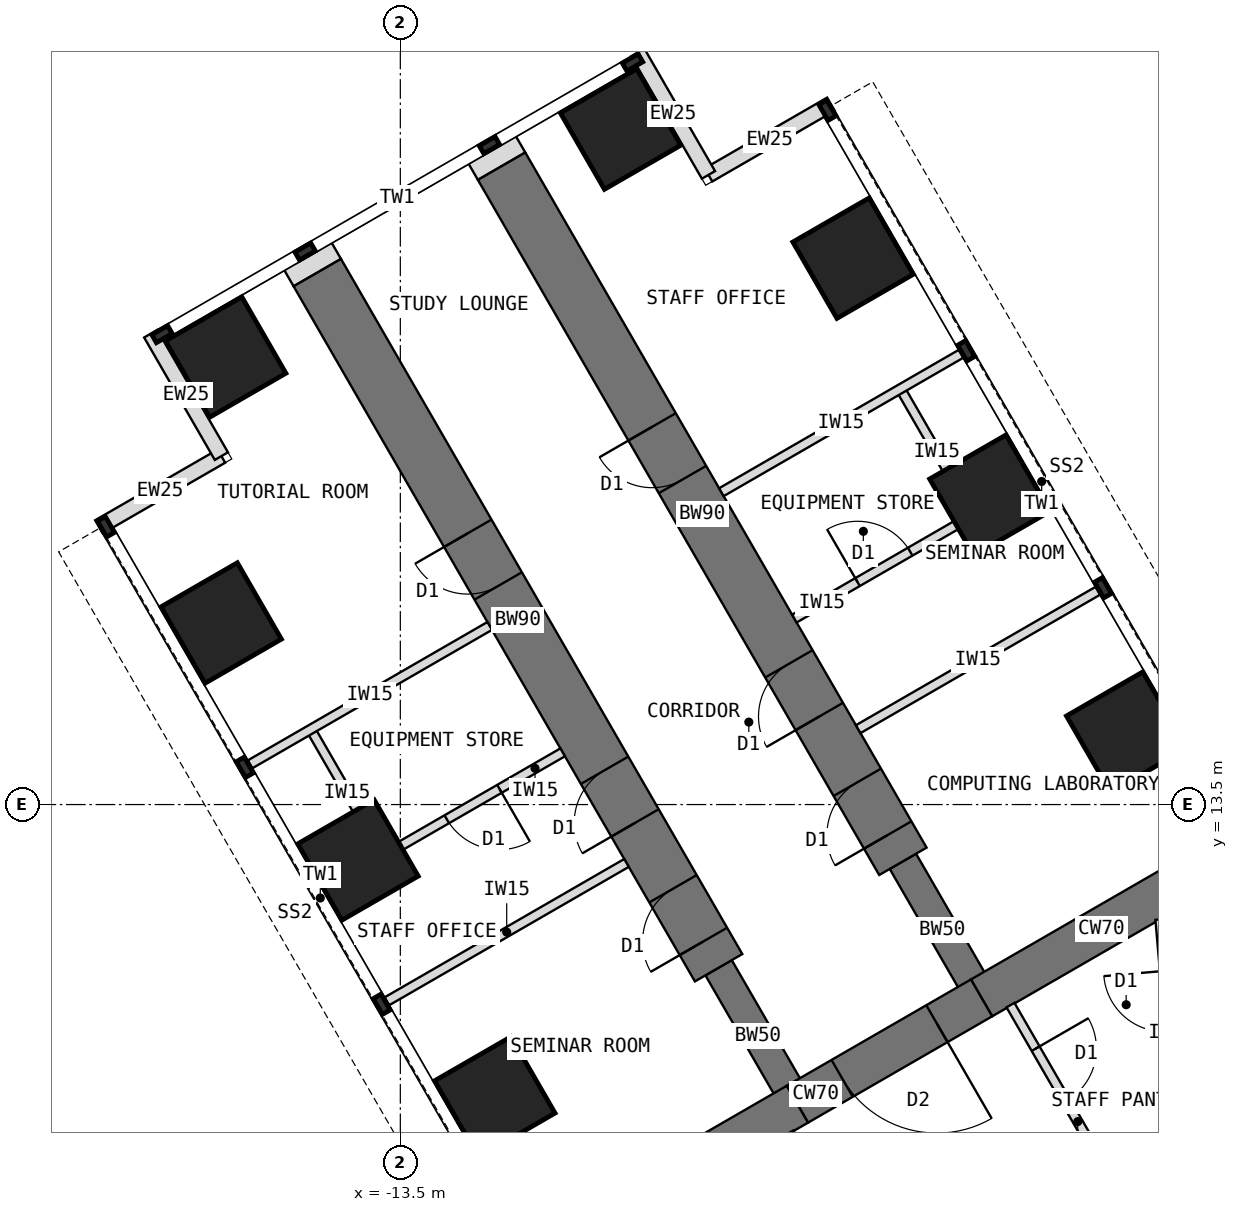
"""IFC4 building model, lengths in metres.
Left out: names, types, materials, properties, quantities, classifications, styles, units other than length and angle.
Written with IfcOpenShell. Run it as: python <this file> out.ifc"""

import sys

from ifc_helpers import new_model, si_unit, direction, frame, frame_2d, origin, origin_2d, place, context, subcontext, project, spatial, rectangle, extrude, element, fill, save


model = new_model("IFC4")
c1 = context("Model", 3, precision=1e-05, world=origin(), true_north=direction((0.0, 1.0)))
c2 = subcontext(c1, "Body", "Model", "MODEL_VIEW")
j1 = project(units=[si_unit("LENGTHUNIT", "METRE"), si_unit("PLANEANGLEUNIT", "RADIAN")], contexts=[c1])
p1 = place(None, origin())
s1 = spatial("IfcSite", under=j1, at=p1, CompositionType="ELEMENT")
p2 = place(p1, origin())
s2 = spatial("IfcBuilding", under=s1, at=p2, CompositionType="ELEMENT")
p3 = place(p2, frame((0.0, 0.0, 68.5)))
s3 = spatial("IfcBuildingStorey", under=s2, at=p3, CompositionType="ELEMENT", Elevation=68.5)
p4 = place(p3, frame((0.0, 12.596, 0.0), z_axis=(0.0, 0.0, 1.0), x_axis=(-0.866011268655, -0.500024481964, 0.0)))
e1 = element("IfcWall", 1, at=p4, inside=s3, PredefinedType="SHEAR", context=c2, shape_type="SweptSolid", body=[
    extrude(rectangle(XDim=4.548, YDim=0.7, at=frame_2d((2.274, 0.0))), origin(), (0.0, 0.0, 1.0), 4.0),
])
p5 = place(p3, frame((-3.939, 10.322, 0.0), z_axis=(0.0, 0.0, 1.0), x_axis=(-0.866019471182, -0.500010275428, 0.0)))
e2 = element("IfcWall", 2, at=p5, inside=s3, PredefinedType="SHEAR", context=c2, shape_type="SweptSolid", body=[
    extrude(rectangle(XDim=3.5, YDim=0.7, at=frame_2d((1.75, 0.0))), origin(), (0.0, 0.0, 1.0), 4.0),
])
p6 = place(p5, frame((0.85, 0.0, 0.0)))
e3 = element("IfcOpeningElement", 3, at=p6, cuts=e2, PredefinedType="OPENING", context=c2, shape_type="SweptSolid", body=[
    extrude(rectangle(XDim=1.8, YDim=2.1, at=frame_2d((0.9, 1.05))), frame((0.0, 0.36, 0.0), z_axis=(0.0, -1.0, 0.0), x_axis=(1.0, 0.0, 0.0)), (0.0, 0.0, 1.0), 0.72),
])
p7 = place(p3, frame((-6.97, 8.572, 0.0), z_axis=(0.0, 0.0, 1.0), x_axis=(-0.866034513004, -0.499984222037, 0.0)))
e4 = element("IfcWall", 4, at=p7, inside=s3, PredefinedType="SHEAR", context=c2, shape_type="SweptSolid", body=[
    extrude(rectangle(XDim=4.548, YDim=0.7, at=frame_2d((2.274, 0.0))), origin(), (0.0, 0.0, 1.0), 4.0),
])
p8 = place(p3, frame((-6.97, 8.572, 0.0), z_axis=(0.0, 0.0, 1.0), x_axis=(-0.499988811324, 0.866031863473, 0.0)))
e5 = element("IfcWall", 5, at=p8, inside=s3, PredefinedType="SHEAR", context=c2, shape_type="SweptSolid", body=[
    extrude(rectangle(XDim=2.592, YDim=0.5, at=frame_2d((1.296, 0.0))), origin(), (0.0, 0.0, 1.0), 4.0),
])
p9 = place(p3, frame((-8.266, 10.816, 0.0), z_axis=(0.0, 0.0, 1.0), x_axis=(-0.499996231654, 0.866027579429, 0.0)))
e6 = element("IfcWall", 6, at=p9, inside=s3, PredefinedType="SHEAR", context=c2, shape_type="SweptSolid", body=[
    extrude(rectangle(XDim=13.2, YDim=0.9, at=frame_2d((6.6, 0.0))), origin(), (0.0, 0.0, 1.0), 4.0),
])
p10 = place(p9, frame((0.5, 0.0, 0.0)))
e7 = element("IfcOpeningElement", 7, at=p10, cuts=e6, PredefinedType="OPENING", context=c2, shape_type="SweptSolid", body=[
    extrude(rectangle(XDim=1.0, YDim=2.1, at=frame_2d((0.5, 1.05))), frame((0.0, 0.46, 0.0), z_axis=(0.0, -1.0, 0.0), x_axis=(1.0, 0.0, 0.0)), (0.0, 0.0, 1.0), 0.92),
])
p11 = place(p9, frame((2.75, 0.0, 0.0)))
e8 = element("IfcOpeningElement", 8, at=p11, cuts=e6, PredefinedType="OPENING", context=c2, shape_type="SweptSolid", body=[
    extrude(rectangle(XDim=1.0, YDim=2.1, at=frame_2d((0.5, 1.05))), frame((0.0, 0.46, 0.0), z_axis=(0.0, -1.0, 0.0), x_axis=(1.0, 0.0, 0.0)), (0.0, 0.0, 1.0), 0.92),
])
p12 = place(p9, frame((7.25, 0.0, 0.0)))
e9 = element("IfcOpeningElement", 9, at=p12, cuts=e6, PredefinedType="OPENING", context=c2, shape_type="SweptSolid", body=[
    extrude(rectangle(XDim=1.0, YDim=2.1, at=frame_2d((0.5, 1.05))), frame((0.0, 0.46, 0.0), z_axis=(0.0, -1.0, 0.0), x_axis=(1.0, 0.0, 0.0)), (0.0, 0.0, 1.0), 0.92),
])
p13 = place(p3, frame((-3.939, 10.322, 0.0), z_axis=(0.0, 0.0, 1.0), x_axis=(-0.499918158782, 0.866072649678, 0.0)))
e10 = element("IfcWall", 10, at=p13, inside=s3, PredefinedType="SHEAR", context=c2, shape_type="SweptSolid", body=[
    extrude(rectangle(XDim=2.592, YDim=0.5, at=frame_2d((1.296, 0.0))), origin(), (0.0, 0.0, 1.0), 4.0),
])
p14 = place(p3, frame((-5.234, 12.566, 0.0), z_axis=(0.0, 0.0, 1.0), x_axis=(-0.500010103361, 0.866019570528, 0.0)))
e11 = element("IfcWall", 11, at=p14, inside=s3, PredefinedType="SHEAR", context=c2, shape_type="SweptSolid", body=[
    extrude(rectangle(XDim=13.2, YDim=0.9, at=frame_2d((6.6, 0.0))), origin(), (0.0, 0.0, 1.0), 4.0),
])
p15 = place(p14, frame((0.5, 0.0, 0.0)))
e12 = element("IfcOpeningElement", 12, at=p15, cuts=e11, PredefinedType="OPENING", context=c2, shape_type="SweptSolid", body=[
    extrude(rectangle(XDim=1.0, YDim=2.1, at=frame_2d((0.5, 1.05))), frame((0.0, 0.46, 0.0), z_axis=(0.0, -1.0, 0.0), x_axis=(1.0, 0.0, 0.0)), (0.0, 0.0, 1.0), 0.92),
])
p16 = place(p14, frame((2.75, 0.0, 0.0)))
e13 = element("IfcOpeningElement", 13, at=p16, cuts=e11, PredefinedType="OPENING", context=c2, shape_type="SweptSolid", body=[
    extrude(rectangle(XDim=1.0, YDim=2.1, at=frame_2d((0.5, 1.05))), frame((0.0, 0.46, 0.0), z_axis=(0.0, -1.0, 0.0), x_axis=(1.0, 0.0, 0.0)), (0.0, 0.0, 1.0), 0.92),
])
p17 = place(p14, frame((7.25, 0.0, 0.0)))
e14 = element("IfcOpeningElement", 14, at=p17, cuts=e11, PredefinedType="OPENING", context=c2, shape_type="SweptSolid", body=[
    extrude(rectangle(XDim=1.0, YDim=2.1, at=frame_2d((0.5, 1.05))), frame((0.0, 0.46, 0.0), z_axis=(0.0, -1.0, 0.0), x_axis=(1.0, 0.0, 0.0)), (0.0, 0.0, 1.0), 0.92),
])
for number, where, z_axis, x_axis in (
    (15, (-11.946, 8.691, 0.0), (0.0, 0.0, 1.0), (0.866, 0.5, 0.0)),
    (16, (-1.554, 14.691, 0.0), (0.0, 0.0, 1.0), (0.866, 0.5, 0.0)),
    (17, (-14.196, 12.588, 0.0), (0.0, 0.0, 1.0), (0.866, 0.5, 0.0)),
    (18, (-3.804, 18.588, 0.0), (0.0, 0.0, 1.0), (0.866, 0.5, 0.0)),
    (19, (-16.446, 16.486, 0.0), (0.0, 0.0, 1.0), (0.866, 0.5, 0.0)),
    (20, (-6.054, 22.486, 0.0), (0.0, 0.0, 1.0), (0.866, 0.5, 0.0)),
    (21, (-16.373, 20.858, 0.0), (0.0, 0.0, 1.0), (0.866, 0.5, 0.0)),
    (22, (-9.877, 24.608, 0.0), (0.0, 0.0, 1.0), (0.866, 0.5, 0.0)),
):
    element("IfcColumn", number, at=place(p3, frame(where, z_axis=z_axis, x_axis=x_axis)), inside=s3, PredefinedType="COLUMN", context=c2, shape_type="SweptSolid", body=[
        extrude(rectangle(XDim=1.45, YDim=1.45, at=origin_2d()), origin(), (0.0, 0.0, 1.0), 4.0),
    ])
for number, where, z_axis, x_axis in (
    (23, (-18.456, 18.067, 0.0), (0.0, 0.0, 1.0), (0.866, 0.5, 0.0)),
    (24, (-16.443, 19.23, 0.0), (0.0, 0.0, 1.0), (-0.5, 0.866, 0.0)),
    (25, (-6.419, 25.017, 0.0), (0.0, 0.0, 1.0), (-0.866, -0.5, 0.0)),
    (26, (-8.432, 23.855, 0.0), (0.0, 0.0, 1.0), (-0.5, 0.866, 0.0)),
):
    element("IfcWall", number, at=place(p3, frame(where, z_axis=z_axis, x_axis=x_axis)), inside=s3, PredefinedType="STANDARD", context=c2, shape_type="SweptSolid", body=[
        extrude(rectangle(XDim=2.325, YDim=0.25, at=frame_2d((1.163, 0.0))), origin(), (0.0, 0.0, 1.0), 3.8),
    ])
for number, where, z_axis, x_axis in (
    (27, (-14.865, 22.248, 0.0), (0.0, 0.0, 1.0), (-0.5, 0.866, 0.0)),
    (28, (-11.834, 23.998, 0.0), (0.0, 0.0, 1.0), (-0.5, 0.866, 0.0)),
):
    element("IfcWall", number, at=place(p3, frame(where, z_axis=z_axis, x_axis=x_axis)), inside=s3, PredefinedType="PARTITIONING", context=c2, shape_type="SweptSolid", body=[
        extrude(rectangle(XDim=0.31, YDim=0.9, at=frame_2d((0.155, 0.0))), origin(), (0.0, 0.0, 1.0), 3.8),
    ])
p18 = place(p3, frame((-1.201, 6.12, 0.0), z_axis=(0.0, 0.0, 1.0), x_axis=(0.500002627198, 0.866023886965, 0.0)))
e29 = element("IfcWall", 29, at=p18, inside=s3, PredefinedType="SHEAR", context=c2, shape_type="SweptSolid", body=[
    extrude(rectangle(XDim=5.858, YDim=0.4, at=frame_2d((2.929, 0.0))), origin(), (0.0, 0.0, 1.0), 4.0),
])
for number, where, z_axis, x_axis in (
    (30, (-9.78, 12.54, 0.0), (0.0, 0.0, 1.0), (-0.866, -0.5, 0.0)),
    (31, (-12.03, 16.437, 0.0), (0.0, 0.0, 1.0), (-0.866, -0.5, 0.0)),
):
    element("IfcWall", number, at=place(p3, frame(where, z_axis=z_axis, x_axis=x_axis)), inside=s3, PredefinedType="PARTITIONING", context=c2, shape_type="SweptSolid", body=[
        extrude(rectangle(XDim=4.55, YDim=0.15, at=frame_2d((2.275, 0.0))), origin(), (0.0, 0.0, 1.0), 3.8),
    ])
p19 = place(p3, frame((-13.775, 12.658, 0.0), z_axis=(0.0, 0.0, 1.0), x_axis=(-0.500033551112, 0.866006032174, 0.0)))
e32 = element("IfcWall", 32, at=p19, inside=s3, PredefinedType="PARTITIONING", context=c2, shape_type="SweptSolid", body=[
    extrude(rectangle(XDim=2.4, YDim=0.15, at=frame_2d((1.2, 0.0))), origin(), (0.0, 0.0, 1.0), 3.8),
])
p20 = place(p3, frame((-10.83, 14.359, 0.0), z_axis=(0.0, 0.0, 1.0), x_axis=(-0.865989465428, -0.500062241894, 0.0)))
e33 = element("IfcWall", 33, at=p20, inside=s3, PredefinedType="PARTITIONING", context=c2, shape_type="SweptSolid", body=[
    extrude(rectangle(XDim=3.4, YDim=0.15, at=frame_2d((1.7, 0.0))), origin(), (0.0, 0.0, 1.0), 3.8),
])
p21 = place(p20, frame((1.2, 0.0, 0.0)))
e34 = element("IfcOpeningElement", 34, at=p21, cuts=e33, PredefinedType="OPENING", context=c2, shape_type="SweptSolid", body=[
    extrude(rectangle(XDim=1.0, YDim=2.1, at=frame_2d((0.5, 1.05))), frame((0.0, 0.085, 0.0), z_axis=(0.0, -1.0, 0.0), x_axis=(1.0, 0.0, 0.0)), (0.0, 0.0, 1.0), 0.17),
])
for number, where, z_axis, x_axis in (
    (35, (-5.97, 14.74, 0.0), (0.0, 0.0, 1.0), (0.866, 0.5, 0.0)),
    (36, (-8.22, 18.637, 0.0), (0.0, 0.0, 1.0), (0.866, 0.5, 0.0)),
):
    element("IfcWall", number, at=place(p3, frame(where, z_axis=z_axis, x_axis=x_axis)), inside=s3, PredefinedType="PARTITIONING", context=c2, shape_type="SweptSolid", body=[
        extrude(rectangle(XDim=4.55, YDim=0.15, at=frame_2d((2.275, 0.0))), origin(), (0.0, 0.0, 1.0), 3.8),
    ])
p22 = place(p3, frame((-4.075, 18.259, 0.0), z_axis=(0.0, 0.0, 1.0), x_axis=(-0.500001309137, 0.866024647952, 0.0)))
e37 = element("IfcWall", 37, at=p22, inside=s3, PredefinedType="PARTITIONING", context=c2, shape_type="SweptSolid", body=[
    extrude(rectangle(XDim=2.4, YDim=0.15, at=frame_2d((1.2, 0.0))), origin(), (0.0, 0.0, 1.0), 3.8),
])
p23 = place(p3, frame((-7.02, 16.559, 0.0), z_axis=(0.0, 0.0, 1.0), x_axis=(0.866038511948, 0.499977295307, 0.0)))
e38 = element("IfcWall", 38, at=p23, inside=s3, PredefinedType="PARTITIONING", context=c2, shape_type="SweptSolid", body=[
    extrude(rectangle(XDim=3.4, YDim=0.15, at=frame_2d((1.7, 0.0))), origin(), (0.0, 0.0, 1.0), 3.8),
])
p24 = place(p23, frame((1.2, 0.0, 0.0)))
e39 = element("IfcOpeningElement", 39, at=p24, cuts=e38, PredefinedType="OPENING", context=c2, shape_type="SweptSolid", body=[
    extrude(rectangle(XDim=1.0, YDim=2.1, at=frame_2d((0.5, 1.05))), frame((0.0, 0.085, 0.0), z_axis=(0.0, -1.0, 0.0), x_axis=(1.0, 0.0, 0.0)), (0.0, 0.0, 1.0), 0.17),
])
p25 = place(p3, frame((-4.89, 4.27, 0.0), z_axis=(0.0, 0.0, 1.0), x_axis=(-0.500007369519, 0.866021148949, 0.0)))
e40 = element("IfcWall", 40, at=p25, inside=s3, PredefinedType="PARTITIONING", context=c2, shape_type="SweptSolid", body=[
    extrude(rectangle(XDim=4.426, YDim=0.15, at=frame_2d((2.213, 0.0))), origin(), (0.0, 0.0, 1.0), 3.8),
])
p26 = place(p25, frame((0.828, 0.0, 0.0)))
e41 = element("IfcOpeningElement", 41, at=p26, cuts=e40, PredefinedType="OPENING", context=c2, shape_type="SweptSolid", body=[
    extrude(rectangle(XDim=1.0, YDim=2.1, at=frame_2d((0.5, 1.05))), frame((0.0, 0.085, 0.0), z_axis=(0.0, -1.0, 0.0), x_axis=(1.0, 0.0, 0.0)), (0.0, 0.0, 1.0), 0.17),
])
p27 = place(p3, frame((-3.466, 10.202, 0.0), z_axis=(0.0, 0.0, 1.0), x_axis=(0.500007369519, -0.866021148949, 0.0)))
e42 = element("IfcWall", 42, at=p27, inside=s3, PredefinedType="PARTITIONING", context=c2, shape_type="SweptSolid", body=[
    extrude(rectangle(XDim=4.426, YDim=0.15, at=frame_2d((2.213, 0.0))), origin(), (0.0, 0.0, 1.0), 3.8),
])
p28 = place(p27, frame((0.828, 0.0, 0.0)))
e43 = element("IfcOpeningElement", 43, at=p28, cuts=e42, PredefinedType="OPENING", context=c2, shape_type="SweptSolid", body=[
    extrude(rectangle(XDim=1.0, YDim=2.1, at=frame_2d((0.5, 1.05))), frame((0.0, 0.085, 0.0), z_axis=(0.0, -1.0, 0.0), x_axis=(1.0, 0.0, 0.0)), (0.0, 0.0, 1.0), 0.17),
])
p29 = place(p3, frame((-0.618, 7.129, 0.0), z_axis=(0.0, 0.0, 1.0), x_axis=(-0.086409450071, 0.996259708579, 0.0)))
e44 = element("IfcWall", 44, at=p29, inside=s3, PredefinedType="PARTITIONING", context=c2, shape_type="SweptSolid", body=[
    extrude(rectangle(XDim=4.498, YDim=0.15, at=frame_2d((2.249, 0.0))), origin(), (0.0, 0.0, 1.0), 3.8),
])
p30 = place(p29, frame((2.648, 0.0, 0.0)))
e45 = element("IfcOpeningElement", 45, at=p30, cuts=e44, PredefinedType="OPENING", context=c2, shape_type="SweptSolid", body=[
    extrude(rectangle(XDim=1.0, YDim=2.1, at=frame_2d((0.5, 1.05))), frame((0.0, 0.085, 0.0), z_axis=(0.0, -1.0, 0.0), x_axis=(1.0, 0.0, 0.0)), (0.0, 0.0, 1.0), 0.17),
])
p31 = place(p6, origin())
e46 = element("IfcDoor", 46, at=p31, inside=s3, OperationType="DOUBLE_DOOR_DOUBLE_SWING", PredefinedType="DOOR", context=c2, shape_type="SweptSolid", body=[
    extrude(rectangle(XDim=1.72, YDim=2.06, at=frame_2d((0.9, 1.03))), frame((0.0, 0.025, 0.0), z_axis=(0.0, -1.0, 0.0), x_axis=(1.0, 0.0, 0.0)), (0.0, 0.0, 1.0), 0.05),
    extrude(rectangle(XDim=0.04, YDim=2.1, at=frame_2d((0.02, 1.05))), frame((0.0, 0.35, 0.0), z_axis=(0.0, -1.0, 0.0), x_axis=(1.0, 0.0, 0.0)), (0.0, 0.0, 1.0), 0.699),
    extrude(rectangle(XDim=0.04, YDim=2.1, at=frame_2d((1.78, 1.05))), frame((0.0, 0.35, 0.0), z_axis=(0.0, -1.0, 0.0), x_axis=(1.0, 0.0, 0.0)), (0.0, 0.0, 1.0), 0.699),
    extrude(rectangle(XDim=1.72, YDim=0.04, at=frame_2d((0.9, 2.08))), frame((0.0, 0.35, 0.0), z_axis=(0.0, -1.0, 0.0), x_axis=(1.0, 0.0, 0.0)), (0.0, 0.0, 1.0), 0.699),
])
fill(e3, e46)
p32 = place(p21, origin())
e47 = element("IfcDoor", 47, at=p32, inside=s3, OperationType="SINGLE_SWING_LEFT", PredefinedType="DOOR", context=c2, shape_type="SweptSolid", body=[
    extrude(rectangle(XDim=1.0, YDim=2.1, at=frame_2d((0.5, 1.05))), frame((0.0, 0.025, 0.0), z_axis=(0.0, -1.0, 0.0), x_axis=(1.0, 0.0, 0.0)), (0.0, 0.0, 1.0), 0.05),
])
fill(e34, e47)
p33 = place(p24, origin())
e48 = element("IfcDoor", 48, at=p33, inside=s3, OperationType="SINGLE_SWING_LEFT", PredefinedType="DOOR", context=c2, shape_type="SweptSolid", body=[
    extrude(rectangle(XDim=1.0, YDim=2.1, at=frame_2d((0.5, 1.05))), frame((0.0, 0.025, 0.0), z_axis=(0.0, -1.0, 0.0), x_axis=(1.0, 0.0, 0.0)), (0.0, 0.0, 1.0), 0.05),
])
fill(e39, e48)
p34 = place(p28, origin())
e49 = element("IfcDoor", 49, at=p34, inside=s3, OperationType="SINGLE_SWING_LEFT", PredefinedType="DOOR", context=c2, shape_type="SweptSolid", body=[
    extrude(rectangle(XDim=1.0, YDim=2.1, at=frame_2d((0.5, 1.05))), frame((0.0, 0.025, 0.0), z_axis=(0.0, -1.0, 0.0), x_axis=(1.0, 0.0, 0.0)), (0.0, 0.0, 1.0), 0.05),
])
fill(e43, e49)
p35 = place(p10, origin())
e50 = element("IfcDoor", 50, at=p35, inside=s3, OperationType="SINGLE_SWING_LEFT", PredefinedType="DOOR", context=c2, shape_type="SweptSolid", body=[
    extrude(rectangle(XDim=0.92, YDim=2.06, at=frame_2d((0.5, 1.03))), frame((0.0, 0.025, 0.0), z_axis=(0.0, -1.0, 0.0), x_axis=(1.0, 0.0, 0.0)), (0.0, 0.0, 1.0), 0.05),
    extrude(rectangle(XDim=0.04, YDim=2.1, at=frame_2d((0.02, 1.05))), frame((0.0, 0.45, 0.0), z_axis=(0.0, -1.0, 0.0), x_axis=(1.0, 0.0, 0.0)), (0.0, 0.0, 1.0), 0.899),
    extrude(rectangle(XDim=0.04, YDim=2.1, at=frame_2d((0.98, 1.05))), frame((0.0, 0.45, 0.0), z_axis=(0.0, -1.0, 0.0), x_axis=(1.0, 0.0, 0.0)), (0.0, 0.0, 1.0), 0.899),
    extrude(rectangle(XDim=0.92, YDim=0.04, at=frame_2d((0.5, 2.08))), frame((0.0, 0.45, 0.0), z_axis=(0.0, -1.0, 0.0), x_axis=(1.0, 0.0, 0.0)), (0.0, 0.0, 1.0), 0.899),
])
fill(e7, e50)
p36 = place(p11, origin())
e51 = element("IfcDoor", 51, at=p36, inside=s3, OperationType="SINGLE_SWING_LEFT", PredefinedType="DOOR", context=c2, shape_type="SweptSolid", body=[
    extrude(rectangle(XDim=0.92, YDim=2.06, at=frame_2d((0.5, 1.03))), frame((0.0, 0.025, 0.0), z_axis=(0.0, -1.0, 0.0), x_axis=(1.0, 0.0, 0.0)), (0.0, 0.0, 1.0), 0.05),
    extrude(rectangle(XDim=0.04, YDim=2.1, at=frame_2d((0.02, 1.05))), frame((0.0, 0.45, 0.0), z_axis=(0.0, -1.0, 0.0), x_axis=(1.0, 0.0, 0.0)), (0.0, 0.0, 1.0), 0.899),
    extrude(rectangle(XDim=0.04, YDim=2.1, at=frame_2d((0.98, 1.05))), frame((0.0, 0.45, 0.0), z_axis=(0.0, -1.0, 0.0), x_axis=(1.0, 0.0, 0.0)), (0.0, 0.0, 1.0), 0.899),
    extrude(rectangle(XDim=0.92, YDim=0.04, at=frame_2d((0.5, 2.08))), frame((0.0, 0.45, 0.0), z_axis=(0.0, -1.0, 0.0), x_axis=(1.0, 0.0, 0.0)), (0.0, 0.0, 1.0), 0.899),
])
fill(e8, e51)
p37 = place(p12, origin())
e52 = element("IfcDoor", 52, at=p37, inside=s3, OperationType="SINGLE_SWING_RIGHT", PredefinedType="DOOR", context=c2, shape_type="SweptSolid", body=[
    extrude(rectangle(XDim=0.92, YDim=2.06, at=frame_2d((0.5, 1.03))), frame((0.0, 0.025, 0.0), z_axis=(0.0, -1.0, 0.0), x_axis=(1.0, 0.0, 0.0)), (0.0, 0.0, 1.0), 0.05),
    extrude(rectangle(XDim=0.04, YDim=2.1, at=frame_2d((0.02, 1.05))), frame((0.0, 0.45, 0.0), z_axis=(0.0, -1.0, 0.0), x_axis=(1.0, 0.0, 0.0)), (0.0, 0.0, 1.0), 0.899),
    extrude(rectangle(XDim=0.04, YDim=2.1, at=frame_2d((0.98, 1.05))), frame((0.0, 0.45, 0.0), z_axis=(0.0, -1.0, 0.0), x_axis=(1.0, 0.0, 0.0)), (0.0, 0.0, 1.0), 0.899),
    extrude(rectangle(XDim=0.92, YDim=0.04, at=frame_2d((0.5, 2.08))), frame((0.0, 0.45, 0.0), z_axis=(0.0, -1.0, 0.0), x_axis=(1.0, 0.0, 0.0)), (0.0, 0.0, 1.0), 0.899),
])
fill(e9, e52)
p38 = place(p15, origin())
e53 = element("IfcDoor", 53, at=p38, inside=s3, OperationType="SINGLE_SWING_LEFT", PredefinedType="DOOR", context=c2, shape_type="SweptSolid", body=[
    extrude(rectangle(XDim=0.92, YDim=2.06, at=frame_2d((0.5, 1.03))), frame((0.0, 0.025, 0.0), z_axis=(0.0, -1.0, 0.0), x_axis=(1.0, 0.0, 0.0)), (0.0, 0.0, 1.0), 0.05),
    extrude(rectangle(XDim=0.04, YDim=2.1, at=frame_2d((0.02, 1.05))), frame((0.0, 0.45, 0.0), z_axis=(0.0, -1.0, 0.0), x_axis=(1.0, 0.0, 0.0)), (0.0, 0.0, 1.0), 0.899),
    extrude(rectangle(XDim=0.04, YDim=2.1, at=frame_2d((0.98, 1.05))), frame((0.0, 0.45, 0.0), z_axis=(0.0, -1.0, 0.0), x_axis=(1.0, 0.0, 0.0)), (0.0, 0.0, 1.0), 0.899),
    extrude(rectangle(XDim=0.92, YDim=0.04, at=frame_2d((0.5, 2.08))), frame((0.0, 0.45, 0.0), z_axis=(0.0, -1.0, 0.0), x_axis=(1.0, 0.0, 0.0)), (0.0, 0.0, 1.0), 0.899),
])
fill(e12, e53)
p39 = place(p16, origin())
e54 = element("IfcDoor", 54, at=p39, inside=s3, OperationType="SINGLE_SWING_LEFT", PredefinedType="DOOR", context=c2, shape_type="SweptSolid", body=[
    extrude(rectangle(XDim=0.92, YDim=2.06, at=frame_2d((0.5, 1.03))), frame((0.0, 0.025, 0.0), z_axis=(0.0, -1.0, 0.0), x_axis=(1.0, 0.0, 0.0)), (0.0, 0.0, 1.0), 0.05),
    extrude(rectangle(XDim=0.04, YDim=2.1, at=frame_2d((0.02, 1.05))), frame((0.0, 0.45, 0.0), z_axis=(0.0, -1.0, 0.0), x_axis=(1.0, 0.0, 0.0)), (0.0, 0.0, 1.0), 0.899),
    extrude(rectangle(XDim=0.04, YDim=2.1, at=frame_2d((0.98, 1.05))), frame((0.0, 0.45, 0.0), z_axis=(0.0, -1.0, 0.0), x_axis=(1.0, 0.0, 0.0)), (0.0, 0.0, 1.0), 0.899),
    extrude(rectangle(XDim=0.92, YDim=0.04, at=frame_2d((0.5, 2.08))), frame((0.0, 0.45, 0.0), z_axis=(0.0, -1.0, 0.0), x_axis=(1.0, 0.0, 0.0)), (0.0, 0.0, 1.0), 0.899),
])
fill(e13, e54)
p40 = place(p17, origin())
e55 = element("IfcDoor", 55, at=p40, inside=s3, OperationType="SINGLE_SWING_RIGHT", PredefinedType="DOOR", context=c2, shape_type="SweptSolid", body=[
    extrude(rectangle(XDim=0.92, YDim=2.06, at=frame_2d((0.5, 1.03))), frame((0.0, 0.025, 0.0), z_axis=(0.0, -1.0, 0.0), x_axis=(1.0, 0.0, 0.0)), (0.0, 0.0, 1.0), 0.05),
    extrude(rectangle(XDim=0.04, YDim=2.1, at=frame_2d((0.02, 1.05))), frame((0.0, 0.45, 0.0), z_axis=(0.0, -1.0, 0.0), x_axis=(1.0, 0.0, 0.0)), (0.0, 0.0, 1.0), 0.899),
    extrude(rectangle(XDim=0.04, YDim=2.1, at=frame_2d((0.98, 1.05))), frame((0.0, 0.45, 0.0), z_axis=(0.0, -1.0, 0.0), x_axis=(1.0, 0.0, 0.0)), (0.0, 0.0, 1.0), 0.899),
    extrude(rectangle(XDim=0.92, YDim=0.04, at=frame_2d((0.5, 2.08))), frame((0.0, 0.45, 0.0), z_axis=(0.0, -1.0, 0.0), x_axis=(1.0, 0.0, 0.0)), (0.0, 0.0, 1.0), 0.899),
])
fill(e14, e55)
save(model, sys.argv[1])
